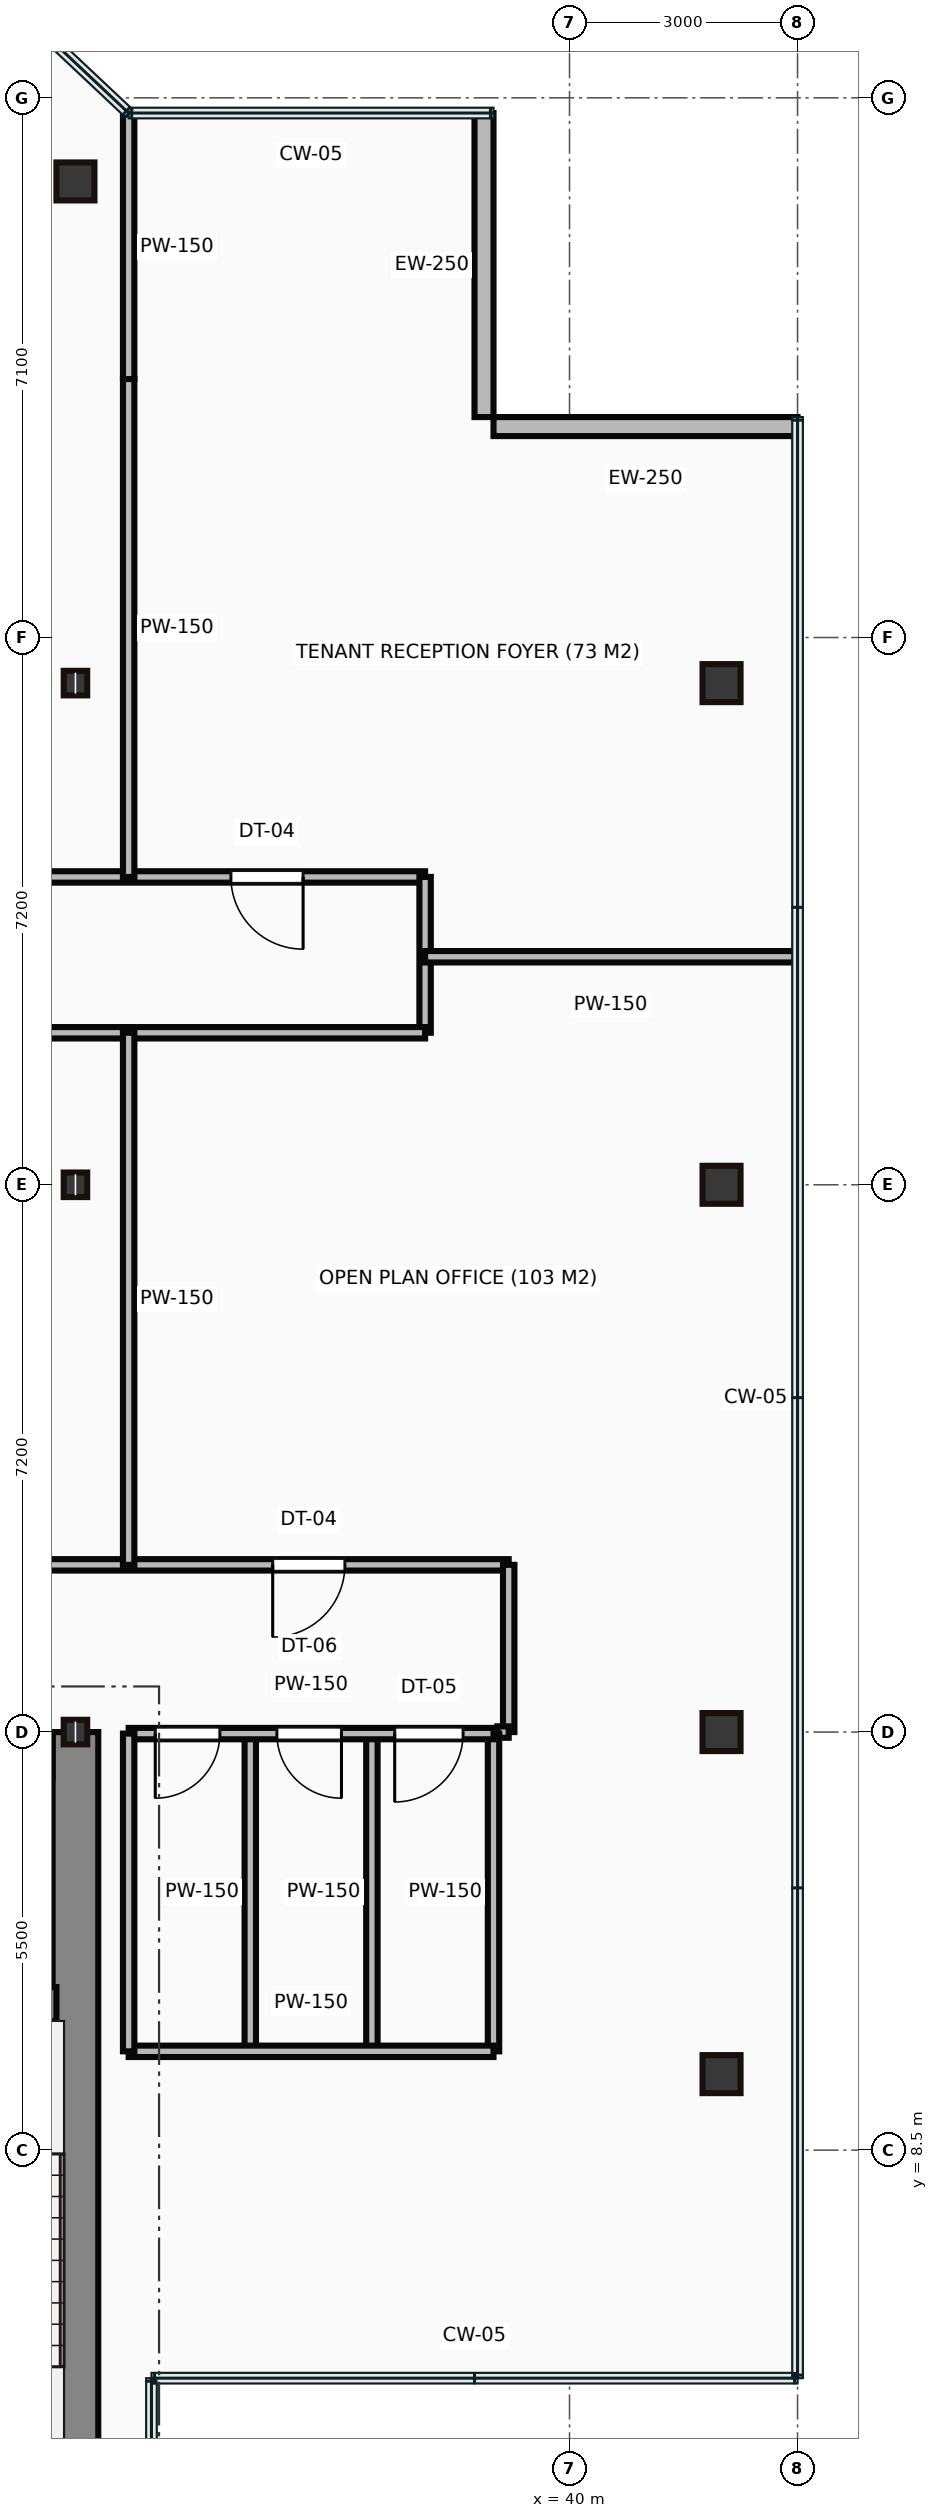
"""IFC4 building model, lengths in metres.
Left out: names, types, materials, properties, quantities, classifications, styles, units other than length and angle.
Written with IfcOpenShell. Run it as: python <this file> out.ifc"""

import sys

from ifc_helpers import new_model, si_unit, direction, frame, frame_2d, origin, origin_2d, place, context, subcontext, project, spatial, rectangle, hollow_rectangle, i_section, extrude, source, transform, mapped, element, fill, save


model = new_model("IFC4")
c1 = context("Model", 3, precision=1e-05, world=origin(), true_north=direction((0.0, 1.0)))
c2 = subcontext(c1, "Body", "Model", "MODEL_VIEW")
j1 = project(units=[si_unit("LENGTHUNIT", "METRE"), si_unit("PLANEANGLEUNIT", "RADIAN")], contexts=[c1])
p1 = place(None, origin())
s1 = spatial("IfcSite", under=j1, at=p1, CompositionType="ELEMENT")
p2 = place(p1, origin())
s2 = spatial("IfcBuilding", under=s1, at=p2, CompositionType="ELEMENT")
p3 = place(p2, frame((0.0, 0.0, 232.4)))
s3 = spatial("IfcBuildingStorey", under=s2, at=p3, CompositionType="ELEMENT", Elevation=232.4)
m1 = source(origin(), c2, "Body", "SweptSolid", [
    extrude(rectangle(XDim=13.1, YDim=0.6, at=frame_2d((6.55, 0.0))), origin(), (0.0, 0.0, 1.0), 3.65),
])
p4 = place(p3, frame((33.5, 0.9, 0.0), z_axis=(0.0, 0.0, 1.0), x_axis=(0.0, 1.0, 0.0)))
e1 = element("IfcWall", 1, at=p4, inside=s3, PredefinedType="SHEAR", context=c2, shape_type="MappedRepresentation", body=[
    mapped(m1, transform((0.0, 0.0, 0.0))),
])
m2 = source(origin(), c2, "Body", "SweptSolid", [
    extrude(rectangle(XDim=3.39, YDim=0.45, at=frame_2d((1.695, 0.0))), origin(), (0.0, 0.0, 1.0), 3.65),
])
p5 = place(p3, frame((29.86, 10.42, 0.0), z_axis=(0.0, 0.0, 1.0), x_axis=(1.0, 0.0, 0.0)))
e2 = element("IfcWall", 2, at=p5, inside=s3, PredefinedType="SHEAR", context=c2, shape_type="MappedRepresentation", body=[
    mapped(m2, transform((0.0, 0.0, 0.0))),
])
p6 = place(p5, frame((1.1, 0.0, 0.0)))
e3 = element("IfcOpeningElement", 3, at=p6, cuts=e2, PredefinedType="OPENING", context=c2, shape_type="SweptSolid", body=[
    extrude(rectangle(XDim=1.1, YDim=2.15, at=frame_2d((0.55, 1.075))), frame((0.0, 0.235, 0.0), z_axis=(0.0, -1.0, 0.0), x_axis=(1.0, 0.0, 0.0)), (0.0, 0.0, 1.0), 0.47),
])
m3 = source(origin(), c2, "Body", "SweptSolid", [
    extrude(i_section(OverallWidth=0.309, OverallDepth=0.323, WebThickness=0.014, FlangeThickness=0.023, at=origin_2d()), origin(), (0.0, 0.0, 1.0), 3.65),
])
for number, where, z_axis, x_axis in (
    (4, (33.5, 14.0, 0.0), (0.0, 0.0, 1.0), (1.0, 0.0, 0.0)),
    (5, (33.5, 21.2, 0.0), (0.0, 0.0, 1.0), (1.0, 0.0, 0.0)),
    (6, (33.5, 27.8, 0.0), (0.0, 0.0, 1.0), (1.0, 0.0, 0.0)),
):
    element("IfcColumn", number, at=place(p3, frame(where, z_axis=z_axis, x_axis=x_axis)), inside=s3, PredefinedType="COLUMN", context=c2, shape_type="MappedRepresentation", body=[
        mapped(m3, transform((0.0, 0.0, 0.0))),
    ])
m4 = source(origin(), c2, "Body", "SweptSolid", [
    extrude(hollow_rectangle(XDim=0.5, YDim=0.5, WallThickness=0.022, at=origin_2d()), origin(), (0.0, 0.0, 1.0), 3.65),
])
for number, where, z_axis, x_axis in (
    (7, (33.5, 34.4, 0.0), (0.0, 0.0, 1.0), (1.0, 0.0, 0.0)),
    (8, (42.0, 9.5, 0.0), (0.0, 0.0, 1.0), (1.0, 0.0, 0.0)),
    (9, (42.0, 14.0, 0.0), (0.0, 0.0, 1.0), (1.0, 0.0, 0.0)),
    (10, (42.0, 21.2, 0.0), (0.0, 0.0, 1.0), (1.0, 0.0, 0.0)),
    (11, (42.0, 27.8, 0.0), (0.0, 0.0, 1.0), (1.0, 0.0, 0.0)),
):
    element("IfcColumn", number, at=place(p3, frame(where, z_axis=z_axis, x_axis=x_axis)), inside=s3, PredefinedType="COLUMN", context=c2, shape_type="MappedRepresentation", body=[
        mapped(m4, transform((0.0, 0.0, 0.0))),
    ])
m5 = source(origin(), c2, "Body", "SweptSolid", [
    extrude(rectangle(XDim=4.0, YDim=0.25, at=frame_2d((2.0, 0.0))), origin(), (0.0, 0.0, 1.0), 3.35),
])
for number, where, z_axis, x_axis in (
    (12, (43.0, 31.175, 0.0), (0.0, 0.0, 1.0), (-1.0, 0.0, 0.0)),
    (13, (38.875, 31.3, 0.0), (0.0, 0.0, 1.0), (0.0, 1.0, 0.0)),
):
    element("IfcWall", number, at=place(p3, frame(where, z_axis=z_axis, x_axis=x_axis)), inside=s3, PredefinedType="STANDARD", context=c2, shape_type="MappedRepresentation", body=[
        mapped(m5, transform((0.0, 0.0, 0.0))),
    ])
m6 = source(origin(), c2, "Body", "SweptSolid", [
    extrude(rectangle(XDim=4.8, YDim=0.15, at=frame_2d((2.4, 0.0))), origin(), (0.0, 0.0, 1.0), 2.737),
])
p7 = place(p3, frame((34.2, 13.98, 0.0), z_axis=(0.0, 0.0, 1.0), x_axis=(1.0, 0.0, 0.0)))
e14 = element("IfcWall", 14, at=p7, inside=s3, PredefinedType="PARTITIONING", context=c2, shape_type="MappedRepresentation", body=[
    mapped(m6, transform((0.0, 0.0, 0.0))),
])
p8 = place(p7, frame((0.35, 0.0, 0.0)))
e15 = element("IfcOpeningElement", 15, at=p8, cuts=e14, PredefinedType="OPENING", context=c2, shape_type="SweptSolid", body=[
    extrude(rectangle(XDim=0.85, YDim=2.1, at=frame_2d((0.425, 1.05))), frame((0.0, 0.085, 0.0), z_axis=(0.0, -1.0, 0.0), x_axis=(1.0, 0.0, 0.0)), (0.0, 0.0, 1.0), 0.17),
])
p9 = place(p7, frame((1.95, 0.0, 0.0)))
e16 = element("IfcOpeningElement", 16, at=p9, cuts=e14, PredefinedType="OPENING", context=c2, shape_type="SweptSolid", body=[
    extrude(rectangle(XDim=0.85, YDim=2.1, at=frame_2d((0.425, 1.05))), frame((0.0, 0.085, 0.0), z_axis=(0.0, -1.0, 0.0), x_axis=(1.0, 0.0, 0.0)), (0.0, 0.0, 1.0), 0.17),
])
p10 = place(p7, frame((3.5, 0.0, 0.0)))
e17 = element("IfcOpeningElement", 17, at=p10, cuts=e14, PredefinedType="OPENING", context=c2, shape_type="SweptSolid", body=[
    extrude(rectangle(XDim=0.9, YDim=2.1, at=frame_2d((0.45, 1.05))), frame((0.0, 0.085, 0.0), z_axis=(0.0, -1.0, 0.0), x_axis=(1.0, 0.0, 0.0)), (0.0, 0.0, 1.0), 0.17),
])
m7 = source(origin(), c2, "Body", "SweptSolid", [
    extrude(rectangle(XDim=4.8, YDim=0.15, at=frame_2d((2.4, 0.0))), origin(), (0.0, 0.0, 1.0), 3.35),
])
p11 = place(p3, frame((34.2, 9.8, 0.0), z_axis=(0.0, 0.0, 1.0), x_axis=(1.0, 0.0, 0.0)))
e18 = element("IfcWall", 18, at=p11, inside=s3, PredefinedType="PARTITIONING", context=c2, shape_type="MappedRepresentation", body=[
    mapped(m7, transform((0.0, 0.0, 0.0))),
])
m8 = source(origin(), c2, "Body", "SweptSolid", [
    extrude(rectangle(XDim=4.18, YDim=0.15, at=frame_2d((2.09, 0.0))), origin(), (0.0, 0.0, 1.0), 3.35),
])
for number, where, z_axis, x_axis in (
    (19, (39.0, 9.8, 0.0), (0.0, 0.0, 1.0), (0.0, 1.0, 0.0)),
    (20, (34.2, 9.8, 0.0), (0.0, 0.0, 1.0), (0.0, 1.0, 0.0)),
    (21, (35.8, 9.8, 0.0), (0.0, 0.0, 1.0), (0.0, 1.0, 0.0)),
    (22, (37.4, 9.8, 0.0), (0.0, 0.0, 1.0), (0.0, 1.0, 0.0)),
):
    element("IfcWall", number, at=place(p3, frame(where, z_axis=z_axis, x_axis=x_axis)), inside=s3, PredefinedType="PARTITIONING", context=c2, shape_type="MappedRepresentation", body=[
        mapped(m8, transform((0.0, 0.0, 0.0))),
    ])
m9 = source(origin(), c2, "Body", "SweptSolid", [
    extrude(rectangle(XDim=26.1, YDim=0.15, at=frame_2d((13.05, 0.0))), origin(), (0.0, 0.0, 1.0), 3.35),
])
p12 = place(p3, frame((12.0, 25.25, 0.0), z_axis=(0.0, 0.0, 1.0), x_axis=(1.0, 0.0, 0.0)))
e23 = element("IfcWall", 23, at=p12, inside=s3, PredefinedType="PARTITIONING", context=c2, shape_type="MappedRepresentation", body=[
    mapped(m9, transform((0.0, 0.0, 0.0))),
])
p13 = place(p12, frame((3.455, 0.0, 0.0)))
e24 = element("IfcOpeningElement", 24, at=p13, cuts=e23, PredefinedType="OPENING", context=c2, shape_type="SweptSolid", body=[
    extrude(rectangle(XDim=0.95, YDim=2.15, at=frame_2d((0.475, 1.075))), frame((0.0, 0.085, 0.0), z_axis=(0.0, -1.0, 0.0), x_axis=(1.0, 0.0, 0.0)), (0.0, 0.0, 1.0), 0.17),
])
p14 = place(p12, frame((14.425, 0.0, 0.0)))
e25 = element("IfcOpeningElement", 25, at=p14, cuts=e23, PredefinedType="OPENING", context=c2, shape_type="SweptSolid", body=[
    extrude(rectangle(XDim=0.95, YDim=2.15, at=frame_2d((0.475, 1.075))), frame((0.0, 0.085, 0.0), z_axis=(0.0, -1.0, 0.0), x_axis=(1.0, 0.0, 0.0)), (0.0, 0.0, 1.0), 0.17),
])
p15 = place(p12, frame((23.545, 0.0, 0.0)))
e26 = element("IfcOpeningElement", 26, at=p15, cuts=e23, PredefinedType="OPENING", context=c2, shape_type="SweptSolid", body=[
    extrude(rectangle(XDim=0.95, YDim=2.15, at=frame_2d((0.475, 1.075))), frame((0.0, 0.085, 0.0), z_axis=(0.0, -1.0, 0.0), x_axis=(1.0, 0.0, 0.0)), (0.0, 0.0, 1.0), 0.17),
])
m10 = source(origin(), c2, "Body", "SweptSolid", [
    extrude(rectangle(XDim=2.05, YDim=0.15, at=frame_2d((1.025, 0.0))), origin(), (0.0, 0.0, 1.0), 3.35),
])
p16 = place(p3, frame((38.1, 25.25, 0.0), z_axis=(0.0, 0.0, 1.0), x_axis=(0.0, -1.0, 0.0)))
e27 = element("IfcWall", 27, at=p16, inside=s3, PredefinedType="PARTITIONING", context=c2, shape_type="MappedRepresentation", body=[
    mapped(m10, transform((0.0, 0.0, 0.0))),
])
p17 = place(p3, frame((38.1, 23.2, 0.0), z_axis=(0.0, 0.0, 1.0), x_axis=(-1.0, 0.0, 0.0)))
e28 = element("IfcWall", 28, at=p17, inside=s3, PredefinedType="PARTITIONING", context=c2, shape_type="MappedRepresentation", body=[
    mapped(m9, transform((0.0, 0.0, 0.0))),
])
p18 = place(p17, frame((10.725, 0.0, 0.0)))
e29 = element("IfcOpeningElement", 29, at=p18, cuts=e28, PredefinedType="OPENING", context=c2, shape_type="SweptSolid", body=[
    extrude(rectangle(XDim=0.95, YDim=2.15, at=frame_2d((0.475, 1.075))), frame((0.0, 0.085, 0.0), z_axis=(0.0, -1.0, 0.0), x_axis=(1.0, 0.0, 0.0)), (0.0, 0.0, 1.0), 0.17),
])
m11 = source(origin(), c2, "Body", "SweptSolid", [
    extrude(rectangle(XDim=27.2, YDim=0.15, at=frame_2d((13.6, 0.0))), origin(), (0.0, 0.0, 1.0), 3.35),
])
p19 = place(p3, frame((12.0, 16.2, 0.0), z_axis=(0.0, 0.0, 1.0), x_axis=(1.0, 0.0, 0.0)))
e30 = element("IfcWall", 30, at=p19, inside=s3, PredefinedType="PARTITIONING", context=c2, shape_type="MappedRepresentation", body=[
    mapped(m11, transform((0.0, 0.0, 0.0))),
])
p20 = place(p19, frame((3.455, 0.0, 0.0)))
e31 = element("IfcOpeningElement", 31, at=p20, cuts=e30, PredefinedType="OPENING", context=c2, shape_type="SweptSolid", body=[
    extrude(rectangle(XDim=0.95, YDim=2.15, at=frame_2d((0.475, 1.075))), frame((0.0, 0.085, 0.0), z_axis=(0.0, -1.0, 0.0), x_axis=(1.0, 0.0, 0.0)), (0.0, 0.0, 1.0), 0.17),
])
p21 = place(p19, frame((24.095, 0.0, 0.0)))
e32 = element("IfcOpeningElement", 32, at=p21, cuts=e30, PredefinedType="OPENING", context=c2, shape_type="SweptSolid", body=[
    extrude(rectangle(XDim=0.95, YDim=2.15, at=frame_2d((0.475, 1.075))), frame((0.0, 0.085, 0.0), z_axis=(0.0, -1.0, 0.0), x_axis=(1.0, 0.0, 0.0)), (0.0, 0.0, 1.0), 0.17),
])
m12 = source(origin(), c2, "Body", "SweptSolid", [
    extrude(rectangle(XDim=2.2, YDim=0.15, at=frame_2d((1.1, 0.0))), origin(), (0.0, 0.0, 1.0), 3.35),
])
p22 = place(p3, frame((39.2, 16.2, 0.0), z_axis=(0.0, 0.0, 1.0), x_axis=(0.0, -1.0, 0.0)))
e33 = element("IfcWall", 33, at=p22, inside=s3, PredefinedType="PARTITIONING", context=c2, shape_type="MappedRepresentation", body=[
    mapped(m12, transform((0.0, 0.0, 0.0))),
])
m13 = source(origin(), c2, "Body", "SweptSolid", [
    extrude(rectangle(XDim=0.15, YDim=0.15, at=frame_2d((0.075, 0.0))), origin(), (0.0, 0.0, 1.0), 3.35),
])
p23 = place(p3, frame((39.2, 14.0, 0.0), z_axis=(0.0, 0.0, 1.0), x_axis=(-1.0, 0.0, 0.0)))
e34 = element("IfcWall", 34, at=p23, inside=s3, PredefinedType="PARTITIONING", context=c2, shape_type="MappedRepresentation", body=[
    mapped(m13, transform((0.0, 0.0, 0.0))),
])
m14 = source(origin(), c2, "Body", "SweptSolid", [
    extrude(rectangle(XDim=7.0, YDim=0.15, at=frame_2d((3.5, 0.0))), origin(), (0.0, 0.0, 1.0), 3.35),
])
p24 = place(p3, frame((34.2, 23.2, 0.0), z_axis=(0.0, 0.0, 1.0), x_axis=(0.0, -1.0, 0.0)))
e35 = element("IfcWall", 35, at=p24, inside=s3, PredefinedType="PARTITIONING", context=c2, shape_type="MappedRepresentation", body=[
    mapped(m14, transform((0.0, 0.0, 0.0))),
])
m15 = source(origin(), c2, "Body", "SweptSolid", [
    extrude(rectangle(XDim=3.48, YDim=0.15, at=frame_2d((1.74, 0.0))), origin(), (0.0, 0.0, 1.0), 3.35),
])
p25 = place(p3, frame((34.2, 35.28, 0.0), z_axis=(0.0, 0.0, 1.0), x_axis=(0.0, -1.0, 0.0)))
e36 = element("IfcWall", 36, at=p25, inside=s3, PredefinedType="PARTITIONING", context=c2, shape_type="MappedRepresentation", body=[
    mapped(m15, transform((0.0, 0.0, 0.0))),
])
m16 = source(origin(), c2, "Body", "SweptSolid", [
    extrude(rectangle(XDim=6.55, YDim=0.15, at=frame_2d((3.275, 0.0))), origin(), (0.0, 0.0, 1.0), 3.35),
])
p26 = place(p3, frame((34.2, 31.8, 0.0), z_axis=(0.0, 0.0, 1.0), x_axis=(0.0, -1.0, 0.0)))
e37 = element("IfcWall", 37, at=p26, inside=s3, PredefinedType="PARTITIONING", context=c2, shape_type="MappedRepresentation", body=[
    mapped(m16, transform((0.0, 0.0, 0.0))),
])
m17 = source(origin(), c2, "Body", "SweptSolid", [
    extrude(rectangle(XDim=4.88, YDim=0.15, at=frame_2d((2.44, 0.0))), origin(), (0.0, 0.0, 1.0), 3.35),
])
p27 = place(p3, frame((42.98, 24.2, 0.0), z_axis=(0.0, 0.0, 1.0), x_axis=(-1.0, 0.0, 0.0)))
e38 = element("IfcWall", 38, at=p27, inside=s3, PredefinedType="PARTITIONING", context=c2, shape_type="MappedRepresentation", body=[
    mapped(m17, transform((0.0, 0.0, 0.0))),
])
m18 = source(origin(), c2, "Body", "SweptSolid", [
    extrude(rectangle(XDim=0.85, YDim=2.1, at=frame_2d((0.425, 1.05))), frame((0.0, 0.025, 0.0), z_axis=(0.0, -1.0, 0.0), x_axis=(1.0, 0.0, 0.0)), (0.0, 0.0, 1.0), 0.05),
])
p28 = place(p8, frame((0.85, 0.0, 0.0), z_axis=(0.0, 0.0, 1.0), x_axis=(-1.0, 0.0, 0.0)))
e39 = element("IfcDoor", 39, at=p28, inside=s3, OperationType="SINGLE_SWING_LEFT", PredefinedType="DOOR", context=c2, shape_type="MappedRepresentation", body=[
    mapped(m18, transform((0.0, 0.0, 0.0))),
])
fill(e15, e39)
p29 = place(p9, frame((0.85, 0.0, 0.0), z_axis=(0.0, 0.0, 1.0), x_axis=(-1.0, 0.0, 0.0)))
e40 = element("IfcDoor", 40, at=p29, inside=s3, OperationType="SINGLE_SWING_RIGHT", PredefinedType="DOOR", context=c2, shape_type="MappedRepresentation", body=[
    mapped(m18, transform((0.0, 0.0, 0.0))),
])
fill(e16, e40)
m19 = source(origin(), c2, "Body", "SweptSolid", [
    extrude(rectangle(XDim=0.9, YDim=2.1, at=frame_2d((0.45, 1.05))), frame((0.0, 0.025, 0.0), z_axis=(0.0, -1.0, 0.0), x_axis=(1.0, 0.0, 0.0)), (0.0, 0.0, 1.0), 0.05),
])
p30 = place(p10, frame((0.9, 0.0, 0.0), z_axis=(0.0, 0.0, 1.0), x_axis=(-1.0, 0.0, 0.0)))
e41 = element("IfcDoor", 41, at=p30, inside=s3, OperationType="SINGLE_SWING_LEFT", PredefinedType="DOOR", context=c2, shape_type="MappedRepresentation", body=[
    mapped(m19, transform((0.0, 0.0, 0.0))),
])
fill(e17, e41)
m20 = source(origin(), c2, "Body", "SweptSolid", [
    extrude(rectangle(XDim=0.95, YDim=2.15, at=frame_2d((0.475, 1.075))), frame((0.0, 0.025, 0.0), z_axis=(0.0, -1.0, 0.0), x_axis=(1.0, 0.0, 0.0)), (0.0, 0.0, 1.0), 0.05),
])
p31 = place(p15, origin())
e42 = element("IfcDoor", 42, at=p31, inside=s3, OperationType="SINGLE_SWING_RIGHT", PredefinedType="DOOR", context=c2, shape_type="MappedRepresentation", body=[
    mapped(m20, transform((0.0, 0.0, 0.0))),
])
fill(e26, e42)
p32 = place(p21, origin())
e43 = element("IfcDoor", 43, at=p32, inside=s3, OperationType="SINGLE_SWING_LEFT", PredefinedType="DOOR", context=c2, shape_type="MappedRepresentation", body=[
    mapped(m20, transform((0.0, 0.0, 0.0))),
])
fill(e32, e43)
save(model, sys.argv[1])
